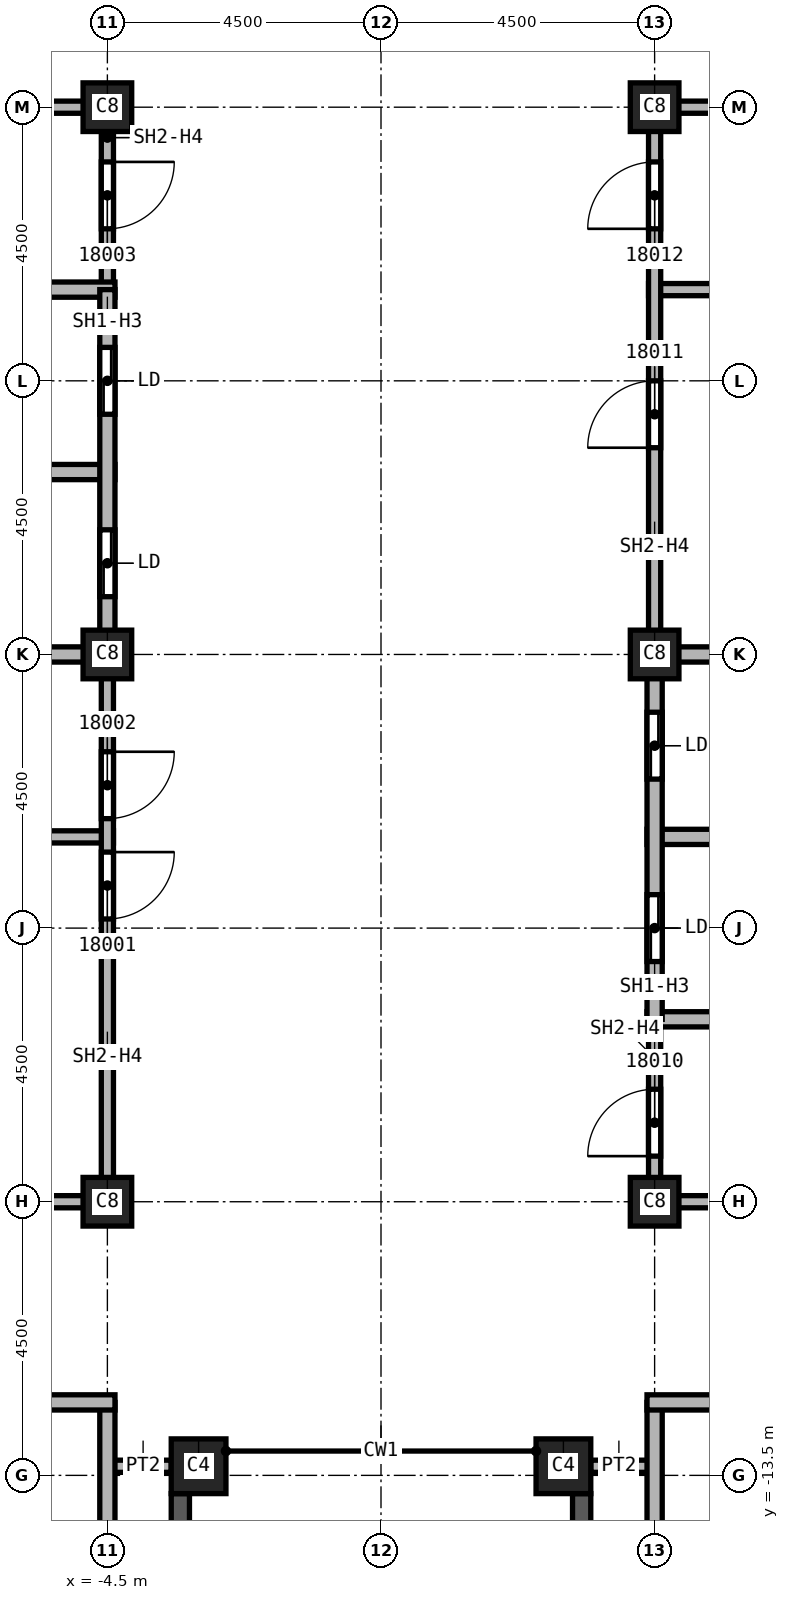
"""IFC4 building model, lengths in metres.
Left out: names, types, materials, properties, quantities, classifications, styles, units other than length and angle.
Written with IfcOpenShell. Run it as: python <this file> out.ifc"""

import sys

from ifc_helpers import new_model, si_unit, direction, frame, frame_2d, origin, origin_2d, place, context, subcontext, project, spatial, rectangle, extrude, element, fill, save


model = new_model("IFC4")
c1 = context("Model", 3, precision=1e-05, world=origin(), true_north=direction((0.0, 1.0)))
c2 = subcontext(c1, "Body", "Model", "MODEL_VIEW")
j1 = project(units=[si_unit("LENGTHUNIT", "METRE"), si_unit("PLANEANGLEUNIT", "RADIAN")], contexts=[c1])
p1 = place(None, origin())
s1 = spatial("IfcSite", under=j1, at=p1, CompositionType="ELEMENT")
p2 = place(p1, origin())
s2 = spatial("IfcBuilding", under=s1, at=p2, CompositionType="ELEMENT")
p3 = place(p2, frame((0.0, 0.0, 266.0)))
s3 = spatial("IfcBuildingStorey", under=s2, at=p3, CompositionType="ELEMENT", Elevation=266.0)
for number, where, z_axis, x_axis in (
    (1, (4.5, 0.0, 0.0), (0.0, 0.0, 1.0), (1.0, 0.0, 0.0)),
    (2, (4.5, 9.0, 0.0), (0.0, 0.0, 1.0), (1.0, 0.0, 0.0)),
    (3, (4.5, -9.0, 0.0), (0.0, 0.0, 1.0), (1.0, 0.0, 0.0)),
    (4, (-4.5, 0.0, 0.0), (0.0, 0.0, 1.0), (1.0, 0.0, 0.0)),
    (5, (-4.5, 9.0, 0.0), (0.0, 0.0, 1.0), (1.0, 0.0, 0.0)),
    (6, (-4.5, -9.0, 0.0), (0.0, 0.0, 1.0), (1.0, 0.0, 0.0)),
):
    element("IfcColumn", number, at=place(p3, frame(where, z_axis=z_axis, x_axis=x_axis)), inside=s3, PredefinedType="COLUMN", context=c2, shape_type="SweptSolid", body=[
        extrude(rectangle(XDim=0.8, YDim=0.8, at=origin_2d()), origin(), (0.0, 0.0, 1.0), 3.72),
    ])
for number, where, z_axis, x_axis in (
    (7, (3.0, -13.35, 0.0), (0.0, 0.0, 1.0), (1.0, 0.0, 0.0)),
    (8, (-3.0, -13.35, 0.0), (0.0, 0.0, 1.0), (1.0, 0.0, 0.0)),
):
    element("IfcColumn", number, at=place(p3, frame(where, z_axis=z_axis, x_axis=x_axis)), inside=s3, PredefinedType="COLUMN", context=c2, shape_type="SweptSolid", body=[
        extrude(rectangle(XDim=0.9, YDim=0.9, at=origin_2d()), origin(), (0.0, 0.0, 1.0), 3.72),
    ])
p4 = place(p3, frame((-3.3, -21.9, 0.0), z_axis=(0.0, 0.0, 1.0), x_axis=(0.0, 1.0, 0.0)))
e9 = element("IfcWall", 9, at=p4, inside=s3, PredefinedType="SOLIDWALL", context=c2, shape_type="SweptSolid", body=[
    extrude(rectangle(XDim=8.1, YDim=0.3, at=frame_2d((4.05, 0.0))), origin(), (0.0, 0.0, 1.0), 3.12),
])
p5 = place(p4, frame((0.825, 0.0, 0.8)))
e10 = element("IfcOpeningElement", 10, at=p5, cuts=e9, PredefinedType="OPENING", context=c2, shape_type="SweptSolid", body=[
    extrude(rectangle(XDim=2.4, YDim=1.95, at=frame_2d((1.2, 0.975))), frame((0.0, 0.15, 0.0), z_axis=(0.0, -1.0, 0.0), x_axis=(1.0, 0.0, 0.0)), (0.0, 0.0, 1.0), 0.3),
])
p6 = place(p4, frame((4.875, 0.0, 0.8)))
e11 = element("IfcOpeningElement", 11, at=p6, cuts=e9, PredefinedType="OPENING", context=c2, shape_type="SweptSolid", body=[
    extrude(rectangle(XDim=2.4, YDim=1.95, at=frame_2d((1.2, 0.975))), frame((0.0, 0.15, 0.0), z_axis=(0.0, -1.0, 0.0), x_axis=(1.0, 0.0, 0.0)), (0.0, 0.0, 1.0), 0.3),
])
p7 = place(p3, frame((3.3, -13.8, 0.0), z_axis=(0.0, 0.0, 1.0), x_axis=(0.0, -1.0, 0.0)))
e12 = element("IfcWall", 12, at=p7, inside=s3, PredefinedType="SOLIDWALL", context=c2, shape_type="SweptSolid", body=[
    extrude(rectangle(XDim=8.1, YDim=0.3, at=frame_2d((4.05, 0.0))), origin(), (0.0, 0.0, 1.0), 3.12),
])
p8 = place(p7, frame((0.825, 0.0, 0.8)))
e13 = element("IfcOpeningElement", 13, at=p8, cuts=e12, PredefinedType="OPENING", context=c2, shape_type="SweptSolid", body=[
    extrude(rectangle(XDim=2.4, YDim=1.95, at=frame_2d((1.2, 0.975))), frame((0.0, 0.15, 0.0), z_axis=(0.0, -1.0, 0.0), x_axis=(1.0, 0.0, 0.0)), (0.0, 0.0, 1.0), 0.3),
])
p9 = place(p7, frame((4.875, 0.0, 0.8)))
e14 = element("IfcOpeningElement", 14, at=p9, cuts=e12, PredefinedType="OPENING", context=c2, shape_type="SweptSolid", body=[
    extrude(rectangle(XDim=2.4, YDim=1.95, at=frame_2d((1.2, 0.975))), frame((0.0, 0.15, 0.0), z_axis=(0.0, -1.0, 0.0), x_axis=(1.0, 0.0, 0.0)), (0.0, 0.0, 1.0), 0.3),
])
for number, where, z_axis, x_axis in (
    (15, (-3.45, -13.35, 0.0), (0.0, 0.0, 1.0), (-1.0, 0.0, 0.0)),
    (16, (4.5, -13.35, 0.0), (0.0, 0.0, 1.0), (-1.0, 0.0, 0.0)),
):
    element("IfcWall", number, at=place(p3, frame(where, z_axis=z_axis, x_axis=x_axis)), inside=s3, PredefinedType="PARTITIONING", context=c2, shape_type="SweptSolid", body=[
        extrude(rectangle(XDim=1.05, YDim=0.2, at=frame_2d((0.525, 0.0))), origin(), (0.0, 0.0, 1.0), 3.72),
    ])
p10 = place(p3, frame((-7.625, -3.0, 0.0), z_axis=(0.0, 0.0, 1.0), x_axis=(1.0, 0.0, 0.0)))
e17 = element("IfcWall", 17, at=p10, inside=s3, PredefinedType="SOLIDWALL", context=c2, shape_type="SweptSolid", body=[
    extrude(rectangle(XDim=3.225, YDim=0.2, at=frame_2d((1.613, 0.0))), origin(), (0.0, 0.0, 1.0), 3.72),
])
for number, where, z_axis, x_axis in (
    (18, (-7.5, 9.0, 0.0), (0.0, 0.0, 1.0), (1.0, 0.0, 0.0)),
    (19, (-4.5, -9.0, 0.0), (0.0, 0.0, 1.0), (-1.0, 0.0, 0.0)),
):
    element("IfcWall", number, at=place(p3, frame(where, z_axis=z_axis, x_axis=x_axis)), inside=s3, PredefinedType="SOLIDWALL", context=c2, shape_type="SweptSolid", body=[
        extrude(rectangle(XDim=3.0, YDim=0.2, at=frame_2d((1.5, 0.0))), origin(), (0.0, 0.0, 1.0), 3.042),
    ])
p11 = place(p3, frame((-4.5, 0.0, 0.0), z_axis=(0.0, 0.0, 1.0), x_axis=(0.0, -1.0, 0.0)))
e20 = element("IfcWall", 20, at=p11, inside=s3, PredefinedType="SOLIDWALL", context=c2, shape_type="SweptSolid", body=[
    extrude(rectangle(XDim=9.1, YDim=0.2, at=frame_2d((4.55, 0.0))), origin(), (0.0, 0.0, 1.0), 3.042),
])
p12 = place(p11, frame((3.25, 0.0, 0.0)))
e21 = element("IfcOpeningElement", 21, at=p12, cuts=e20, PredefinedType="OPENING", context=c2, shape_type="SweptSolid", body=[
    extrude(rectangle(XDim=1.1, YDim=2.1, at=frame_2d((0.55, 1.05))), frame((0.0, 0.1, 0.0), z_axis=(0.0, -1.0, 0.0), x_axis=(1.0, 0.0, 0.0)), (0.0, 0.0, 1.0), 0.2),
])
p13 = place(p11, frame((1.6, 0.0, 0.0)))
e22 = element("IfcOpeningElement", 22, at=p13, cuts=e20, PredefinedType="OPENING", context=c2, shape_type="SweptSolid", body=[
    extrude(rectangle(XDim=1.1, YDim=2.1, at=frame_2d((0.55, 1.05))), frame((0.0, 0.1, 0.0), z_axis=(0.0, -1.0, 0.0), x_axis=(1.0, 0.0, 0.0)), (0.0, 0.0, 1.0), 0.2),
])
p14 = place(p3, frame((-4.5, 9.1, 0.0), z_axis=(0.0, 0.0, 1.0), x_axis=(0.0, -1.0, 0.0)))
e23 = element("IfcWall", 23, at=p14, inside=s3, PredefinedType="SOLIDWALL", context=c2, shape_type="SweptSolid", body=[
    extrude(rectangle(XDim=3.1, YDim=0.2, at=frame_2d((1.55, 0.0))), origin(), (0.0, 0.0, 1.0), 3.042),
])
p15 = place(p14, frame((1.0, 0.0, 0.0)))
e24 = element("IfcOpeningElement", 24, at=p15, cuts=e23, PredefinedType="OPENING", context=c2, shape_type="SweptSolid", body=[
    extrude(rectangle(XDim=1.1, YDim=2.1, at=frame_2d((0.55, 1.05))), frame((0.0, 0.1, 0.0), z_axis=(0.0, -1.0, 0.0), x_axis=(1.0, 0.0, 0.0)), (0.0, 0.0, 1.0), 0.2),
])
p16 = place(p3, frame((4.4, 6.0, 0.0), z_axis=(0.0, 0.0, 1.0), x_axis=(1.0, 0.0, 0.0)))
e25 = element("IfcWall", 25, at=p16, inside=s3, PredefinedType="SOLIDWALL", context=c2, shape_type="SweptSolid", body=[
    extrude(rectangle(XDim=3.2, YDim=0.2, at=frame_2d((1.6, 0.0))), origin(), (0.0, 0.0, 1.0), 3.72),
])
p17 = place(p3, frame((4.5, -9.1, 0.0), z_axis=(0.0, 0.0, 1.0), x_axis=(0.0, 1.0, 0.0)))
e26 = element("IfcWall", 26, at=p17, inside=s3, PredefinedType="SOLIDWALL", context=c2, shape_type="SweptSolid", body=[
    extrude(rectangle(XDim=3.1, YDim=0.2, at=frame_2d((1.55, 0.0))), origin(), (0.0, 0.0, 1.0), 3.042),
])
p18 = place(p17, frame((0.85, 0.0, 0.0)))
e27 = element("IfcOpeningElement", 27, at=p18, cuts=e26, PredefinedType="OPENING", context=c2, shape_type="SweptSolid", body=[
    extrude(rectangle(XDim=1.1, YDim=2.1, at=frame_2d((0.55, 1.05))), frame((0.0, 0.1, 0.0), z_axis=(0.0, -1.0, 0.0), x_axis=(1.0, 0.0, 0.0)), (0.0, 0.0, 1.0), 0.2),
])
p19 = place(p3, frame((4.5, 0.0, 0.0), z_axis=(0.0, 0.0, 1.0), x_axis=(0.0, 1.0, 0.0)))
e28 = element("IfcWall", 28, at=p19, inside=s3, PredefinedType="SOLIDWALL", context=c2, shape_type="SweptSolid", body=[
    extrude(rectangle(XDim=9.1, YDim=0.2, at=frame_2d((4.55, 0.0))), origin(), (0.0, 0.0, 1.0), 3.042),
])
p20 = place(p19, frame((3.4, 0.0, 0.0)))
e29 = element("IfcOpeningElement", 29, at=p20, cuts=e28, PredefinedType="OPENING", context=c2, shape_type="SweptSolid", body=[
    extrude(rectangle(XDim=1.1, YDim=2.1, at=frame_2d((0.55, 1.05))), frame((0.0, 0.1, 0.0), z_axis=(0.0, -1.0, 0.0), x_axis=(1.0, 0.0, 0.0)), (0.0, 0.0, 1.0), 0.2),
])
p21 = place(p19, frame((7.0, 0.0, 0.0)))
e30 = element("IfcOpeningElement", 30, at=p21, cuts=e28, PredefinedType="OPENING", context=c2, shape_type="SweptSolid", body=[
    extrude(rectangle(XDim=1.1, YDim=2.1, at=frame_2d((0.55, 1.05))), frame((0.0, 0.1, 0.0), z_axis=(0.0, -1.0, 0.0), x_axis=(1.0, 0.0, 0.0)), (0.0, 0.0, 1.0), 0.2),
])
for number, where, z_axis, x_axis in (
    (31, (4.5, 9.0, 0.0), (0.0, 0.0, 1.0), (1.0, 0.0, 0.0)),
    (32, (7.5, -9.0, 0.0), (0.0, 0.0, 1.0), (-1.0, 0.0, 0.0)),
):
    element("IfcWall", number, at=place(p3, frame(where, z_axis=z_axis, x_axis=x_axis)), inside=s3, PredefinedType="SOLIDWALL", context=c2, shape_type="SweptSolid", body=[
        extrude(rectangle(XDim=3.0, YDim=0.2, at=frame_2d((1.5, 0.0))), origin(), (0.0, 0.0, 1.0), 3.042),
    ])
p22 = place(p3, frame((-13.625, 3.0, 0.0), z_axis=(0.0, 0.0, 1.0), x_axis=(1.0, 0.0, 0.0)))
e33 = element("IfcWall", 33, at=p22, inside=s3, PredefinedType="SOLIDWALL", context=c2, shape_type="SweptSolid", body=[
    extrude(rectangle(XDim=9.25, YDim=0.25, at=frame_2d((4.625, 0.0))), origin(), (0.0, 0.0, 1.0), 3.72),
])
p23 = place(p22, frame((3.25, 0.0, 0.0)))
e34 = element("IfcOpeningElement", 34, at=p23, cuts=e33, PredefinedType="OPENING", context=c2, shape_type="SweptSolid", body=[
    extrude(rectangle(XDim=1.1, YDim=2.1, at=frame_2d((0.55, 1.05))), frame((0.0, 0.125, 0.0), z_axis=(0.0, -1.0, 0.0), x_axis=(1.0, 0.0, 0.0)), (0.0, 0.0, 1.0), 0.25),
])
for number, where, z_axis, x_axis in (
    (35, (-7.625, 0.0, 0.0), (0.0, 0.0, 1.0), (1.0, 0.0, 0.0)),
    (36, (-7.625, 6.0, 0.0), (0.0, 0.0, 1.0), (1.0, 0.0, 0.0)),
):
    element("IfcWall", number, at=place(p3, frame(where, z_axis=z_axis, x_axis=x_axis)), inside=s3, PredefinedType="SOLIDWALL", context=c2, shape_type="SweptSolid", body=[
        extrude(rectangle(XDim=3.25, YDim=0.25, at=frame_2d((1.625, 0.0))), origin(), (0.0, 0.0, 1.0), 3.72),
    ])
p24 = place(p3, frame((-4.5, 6.0, 0.0), z_axis=(0.0, 0.0, 1.0), x_axis=(0.0, -1.0, 0.0)))
e37 = element("IfcWall", 37, at=p24, inside=s3, PredefinedType="SOLIDWALL", context=c2, shape_type="SweptSolid", body=[
    extrude(rectangle(XDim=6.0, YDim=0.25, at=frame_2d((3.0, 0.0))), origin(), (0.0, 0.0, 1.0), 3.042),
])
p25 = place(p24, frame((3.95, 0.0, 0.0)))
e38 = element("IfcOpeningElement", 38, at=p25, cuts=e37, PredefinedType="OPENING", context=c2, shape_type="SweptSolid", body=[
    extrude(rectangle(XDim=1.1, YDim=2.1, at=frame_2d((0.55, 1.05))), frame((0.0, 0.125, 0.0), z_axis=(0.0, -1.0, 0.0), x_axis=(1.0, 0.0, 0.0)), (0.0, 0.0, 1.0), 0.25),
])
p26 = place(p24, frame((0.95, 0.0, 0.0)))
e39 = element("IfcOpeningElement", 39, at=p26, cuts=e37, PredefinedType="OPENING", context=c2, shape_type="SweptSolid", body=[
    extrude(rectangle(XDim=1.1, YDim=2.1, at=frame_2d((0.55, 1.05))), frame((0.0, 0.125, 0.0), z_axis=(0.0, -1.0, 0.0), x_axis=(1.0, 0.0, 0.0)), (0.0, 0.0, 1.0), 0.25),
])
p27 = place(p3, frame((4.375, -6.0, 0.0), z_axis=(0.0, 0.0, 1.0), x_axis=(1.0, 0.0, 0.0)))
e40 = element("IfcWall", 40, at=p27, inside=s3, PredefinedType="SOLIDWALL", context=c2, shape_type="SweptSolid", body=[
    extrude(rectangle(XDim=3.25, YDim=0.25, at=frame_2d((1.625, 0.0))), origin(), (0.0, 0.0, 1.0), 3.72),
])
p28 = place(p3, frame((4.375, -3.0, 0.0), z_axis=(0.0, 0.0, 1.0), x_axis=(1.0, 0.0, 0.0)))
e41 = element("IfcWall", 41, at=p28, inside=s3, PredefinedType="SOLIDWALL", context=c2, shape_type="SweptSolid", body=[
    extrude(rectangle(XDim=9.25, YDim=0.25, at=frame_2d((4.625, 0.0))), origin(), (0.0, 0.0, 1.0), 3.72),
])
p29 = place(p28, frame((3.375, 0.0, 0.0)))
e42 = element("IfcOpeningElement", 42, at=p29, cuts=e41, PredefinedType="OPENING", context=c2, shape_type="SweptSolid", body=[
    extrude(rectangle(XDim=1.1, YDim=2.1, at=frame_2d((0.55, 1.05))), frame((0.0, 0.125, 0.0), z_axis=(0.0, -1.0, 0.0), x_axis=(1.0, 0.0, 0.0)), (0.0, 0.0, 1.0), 0.25),
])
p30 = place(p3, frame((4.375, 0.0, 0.0), z_axis=(0.0, 0.0, 1.0), x_axis=(1.0, 0.0, 0.0)))
e43 = element("IfcWall", 43, at=p30, inside=s3, PredefinedType="SOLIDWALL", context=c2, shape_type="SweptSolid", body=[
    extrude(rectangle(XDim=3.25, YDim=0.25, at=frame_2d((1.625, 0.0))), origin(), (0.0, 0.0, 1.0), 3.72),
])
p31 = place(p3, frame((4.5, -6.0, 0.0), z_axis=(0.0, 0.0, 1.0), x_axis=(0.0, 1.0, 0.0)))
e44 = element("IfcWall", 44, at=p31, inside=s3, PredefinedType="SOLIDWALL", context=c2, shape_type="SweptSolid", body=[
    extrude(rectangle(XDim=6.0, YDim=0.25, at=frame_2d((3.0, 0.0))), origin(), (0.0, 0.0, 1.0), 3.042),
])
p32 = place(p31, frame((0.95, 0.0, 0.0)))
e45 = element("IfcOpeningElement", 45, at=p32, cuts=e44, PredefinedType="OPENING", context=c2, shape_type="SweptSolid", body=[
    extrude(rectangle(XDim=1.1, YDim=2.1, at=frame_2d((0.55, 1.05))), frame((0.0, 0.125, 0.0), z_axis=(0.0, -1.0, 0.0), x_axis=(1.0, 0.0, 0.0)), (0.0, 0.0, 1.0), 0.25),
])
p33 = place(p31, frame((3.95, 0.0, 0.0)))
e46 = element("IfcOpeningElement", 46, at=p33, cuts=e44, PredefinedType="OPENING", context=c2, shape_type="SweptSolid", body=[
    extrude(rectangle(XDim=1.1, YDim=2.1, at=frame_2d((0.55, 1.05))), frame((0.0, 0.125, 0.0), z_axis=(0.0, -1.0, 0.0), x_axis=(1.0, 0.0, 0.0)), (0.0, 0.0, 1.0), 0.25),
])
p34 = place(p3, frame((-4.5, -12.3, 0.0), z_axis=(0.0, 0.0, 1.0), x_axis=(0.0, -1.0, 0.0)))
e47 = element("IfcWall", 47, at=p34, inside=s3, PredefinedType="SOLIDWALL", context=c2, shape_type="SweptSolid", body=[
    extrude(rectangle(XDim=4.625, YDim=0.25, at=frame_2d((2.312, 0.0))), origin(), (0.0, 0.0, 1.0), 3.72),
])
p35 = place(p3, frame((-4.375, -12.3, 0.0), z_axis=(0.0, 0.0, 1.0), x_axis=(-1.0, 0.0, 0.0)))
e48 = element("IfcWall", 48, at=p35, inside=s3, PredefinedType="SOLIDWALL", context=c2, shape_type="SweptSolid", body=[
    extrude(rectangle(XDim=9.25, YDim=0.25, at=frame_2d((4.625, 0.0))), origin(), (0.0, 0.0, 1.0), 3.72),
])
p36 = place(p35, frame((7.2, 0.0, 0.0)))
e49 = element("IfcOpeningElement", 49, at=p36, cuts=e48, PredefinedType="OPENING", context=c2, shape_type="SweptSolid", body=[
    extrude(rectangle(XDim=1.2, YDim=2.1, at=frame_2d((0.6, 1.05))), frame((0.0, 0.125, 0.0), z_axis=(0.0, -1.0, 0.0), x_axis=(1.0, 0.0, 0.0)), (0.0, 0.0, 1.0), 0.25),
])
p37 = place(p3, frame((4.5, -16.8, 0.0), z_axis=(0.0, 0.0, 1.0), x_axis=(0.0, 1.0, 0.0)))
e50 = element("IfcWall", 50, at=p37, inside=s3, PredefinedType="SOLIDWALL", context=c2, shape_type="SweptSolid", body=[
    extrude(rectangle(XDim=4.5, YDim=0.25, at=frame_2d((2.25, 0.0))), origin(), (0.0, 0.0, 1.0), 3.72),
])
p38 = place(p3, frame((13.625, -12.3, 0.0), z_axis=(0.0, 0.0, 1.0), x_axis=(-1.0, 0.0, 0.0)))
e51 = element("IfcWall", 51, at=p38, inside=s3, PredefinedType="SOLIDWALL", context=c2, shape_type="SweptSolid", body=[
    extrude(rectangle(XDim=9.25, YDim=0.25, at=frame_2d((4.625, 0.0))), origin(), (0.0, 0.0, 1.0), 3.72),
])
p39 = place(p38, frame((0.85, 0.0, 0.0)))
e52 = element("IfcOpeningElement", 52, at=p39, cuts=e51, PredefinedType="OPENING", context=c2, shape_type="SweptSolid", body=[
    extrude(rectangle(XDim=1.2, YDim=2.1, at=frame_2d((0.6, 1.05))), frame((0.0, 0.125, 0.0), z_axis=(0.0, -1.0, 0.0), x_axis=(1.0, 0.0, 0.0)), (0.0, 0.0, 1.0), 0.25),
])
p40 = place(p12, origin())
e53 = element("IfcDoor", 53, at=p40, inside=s3, OperationType="SINGLE_SWING_RIGHT", PredefinedType="DOOR", context=c2, shape_type="SweptSolid", body=[
    extrude(rectangle(XDim=1.1, YDim=2.1, at=frame_2d((0.55, 1.05))), frame((0.0, 0.025, 0.0), z_axis=(0.0, -1.0, 0.0), x_axis=(1.0, 0.0, 0.0)), (0.0, 0.0, 1.0), 0.05),
])
fill(e21, e53)
p41 = place(p13, origin())
e54 = element("IfcDoor", 54, at=p41, inside=s3, OperationType="SINGLE_SWING_LEFT", PredefinedType="DOOR", context=c2, shape_type="SweptSolid", body=[
    extrude(rectangle(XDim=1.1, YDim=2.1, at=frame_2d((0.55, 1.05))), frame((0.0, 0.025, 0.0), z_axis=(0.0, -1.0, 0.0), x_axis=(1.0, 0.0, 0.0)), (0.0, 0.0, 1.0), 0.05),
])
fill(e22, e54)
p42 = place(p15, origin())
e55 = element("IfcDoor", 55, at=p42, inside=s3, OperationType="SINGLE_SWING_RIGHT", PredefinedType="DOOR", context=c2, shape_type="SweptSolid", body=[
    extrude(rectangle(XDim=1.1, YDim=2.1, at=frame_2d((0.55, 1.05))), frame((0.0, 0.025, 0.0), z_axis=(0.0, -1.0, 0.0), x_axis=(1.0, 0.0, 0.0)), (0.0, 0.0, 1.0), 0.05),
])
fill(e24, e55)
p43 = place(p18, origin())
e56 = element("IfcDoor", 56, at=p43, inside=s3, OperationType="SINGLE_SWING_LEFT", PredefinedType="DOOR", context=c2, shape_type="SweptSolid", body=[
    extrude(rectangle(XDim=1.1, YDim=2.1, at=frame_2d((0.55, 1.05))), frame((0.0, 0.025, 0.0), z_axis=(0.0, -1.0, 0.0), x_axis=(1.0, 0.0, 0.0)), (0.0, 0.0, 1.0), 0.05),
])
fill(e27, e56)
p44 = place(p20, origin())
e57 = element("IfcDoor", 57, at=p44, inside=s3, OperationType="SINGLE_SWING_RIGHT", PredefinedType="DOOR", context=c2, shape_type="SweptSolid", body=[
    extrude(rectangle(XDim=1.1, YDim=2.1, at=frame_2d((0.55, 1.05))), frame((0.0, 0.025, 0.0), z_axis=(0.0, -1.0, 0.0), x_axis=(1.0, 0.0, 0.0)), (0.0, 0.0, 1.0), 0.05),
])
fill(e29, e57)
p45 = place(p21, origin())
e58 = element("IfcDoor", 58, at=p45, inside=s3, OperationType="SINGLE_SWING_LEFT", PredefinedType="DOOR", context=c2, shape_type="SweptSolid", body=[
    extrude(rectangle(XDim=1.1, YDim=2.1, at=frame_2d((0.55, 1.05))), frame((0.0, 0.025, 0.0), z_axis=(0.0, -1.0, 0.0), x_axis=(1.0, 0.0, 0.0)), (0.0, 0.0, 1.0), 0.05),
])
fill(e30, e58)
p46 = place(p25, origin())
e59 = element("IfcDoor", 59, at=p46, inside=s3, OperationType="SLIDING_TO_LEFT", PredefinedType="DOOR", context=c2, shape_type="SweptSolid", body=[
    extrude(rectangle(XDim=1.1, YDim=2.1, at=frame_2d((0.55, 1.05))), frame((0.0, 0.025, 0.0), z_axis=(0.0, -1.0, 0.0), x_axis=(1.0, 0.0, 0.0)), (0.0, 0.0, 1.0), 0.05),
])
fill(e38, e59)
p47 = place(p26, origin())
e60 = element("IfcDoor", 60, at=p47, inside=s3, OperationType="SLIDING_TO_LEFT", PredefinedType="DOOR", context=c2, shape_type="SweptSolid", body=[
    extrude(rectangle(XDim=1.1, YDim=2.1, at=frame_2d((0.55, 1.05))), frame((0.0, 0.025, 0.0), z_axis=(0.0, -1.0, 0.0), x_axis=(1.0, 0.0, 0.0)), (0.0, 0.0, 1.0), 0.05),
])
fill(e39, e60)
p48 = place(p32, origin())
e61 = element("IfcDoor", 61, at=p48, inside=s3, OperationType="SLIDING_TO_LEFT", PredefinedType="DOOR", context=c2, shape_type="SweptSolid", body=[
    extrude(rectangle(XDim=1.1, YDim=2.1, at=frame_2d((0.55, 1.05))), frame((0.0, 0.025, 0.0), z_axis=(0.0, -1.0, 0.0), x_axis=(1.0, 0.0, 0.0)), (0.0, 0.0, 1.0), 0.05),
])
fill(e45, e61)
p49 = place(p33, origin())
e62 = element("IfcDoor", 62, at=p49, inside=s3, OperationType="SLIDING_TO_LEFT", PredefinedType="DOOR", context=c2, shape_type="SweptSolid", body=[
    extrude(rectangle(XDim=1.1, YDim=2.1, at=frame_2d((0.55, 1.05))), frame((0.0, 0.025, 0.0), z_axis=(0.0, -1.0, 0.0), x_axis=(1.0, 0.0, 0.0)), (0.0, 0.0, 1.0), 0.05),
])
fill(e46, e62)
save(model, sys.argv[1])
